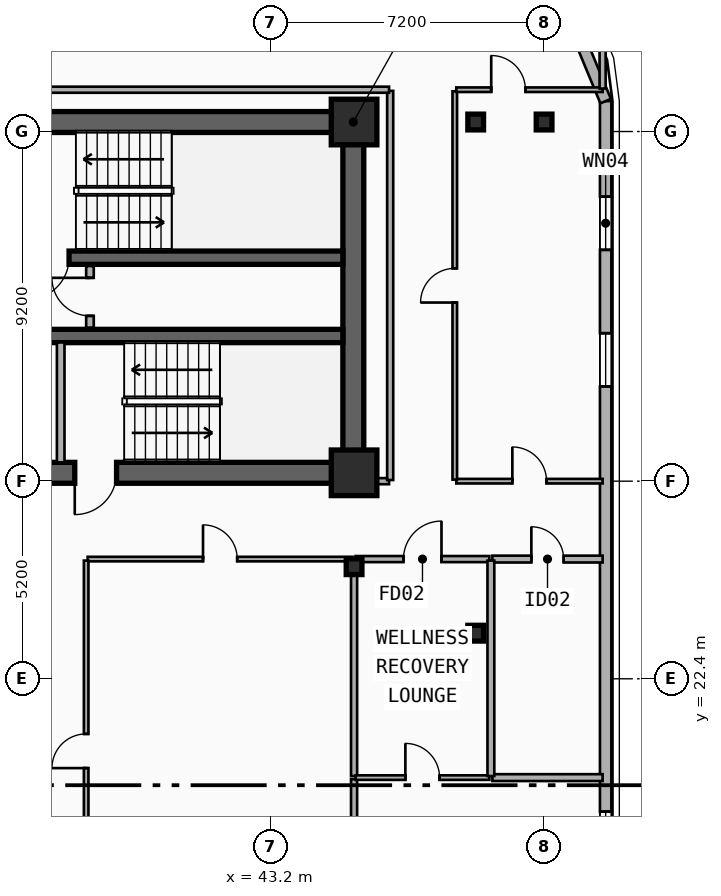
"""IFC4 building model, lengths in metres.
Left out: names, types, materials, properties, quantities, classifications, styles, units other than length and angle.
Written with IfcOpenShell. Run it as: python <this file> out.ifc"""

import sys

from ifc_helpers import new_model, si_unit, direction, frame, frame_2d, origin, origin_2d, place, context, subcontext, project, spatial, rectangle, i_section, extrude, element, fill, save


model = new_model("IFC4")
c1 = context("Model", 3, precision=1e-05, world=origin(), true_north=direction((0.0, 1.0)))
c2 = subcontext(c1, "Body", "Model", "MODEL_VIEW")
j1 = project(units=[si_unit("LENGTHUNIT", "METRE"), si_unit("PLANEANGLEUNIT", "RADIAN")], contexts=[c1])
p1 = place(None, origin())
s1 = spatial("IfcSite", under=j1, at=p1, CompositionType="ELEMENT")
p2 = place(p1, origin())
s2 = spatial("IfcBuilding", under=s1, at=p2, CompositionType="ELEMENT")
p3 = place(p2, frame((0.0, 0.0, 155.45)))
s3 = spatial("IfcBuildingStorey", under=s2, at=p3, CompositionType="ELEMENT", Elevation=155.45)
p4 = place(p3, frame((12.15, 37.05, 0.0), z_axis=(0.0, 0.0, 1.0), x_axis=(1.0, 0.0, 0.0)))
e1 = element("IfcWall", 1, at=p4, inside=s3, PredefinedType="SHEAR", context=c2, shape_type="SweptSolid", body=[
    extrude(rectangle(XDim=33.23, YDim=0.55, at=frame_2d((16.615, 0.0))), origin(), (0.0, 0.0, 1.0), 3.55),
])
p5 = place(p3, frame((45.38, 27.82, 0.0), z_axis=(0.0, 0.0, 1.0), x_axis=(-1.0, 0.0, 0.0)))
e2 = element("IfcWall", 2, at=p5, inside=s3, PredefinedType="SHEAR", context=c2, shape_type="SweptSolid", body=[
    extrude(rectangle(XDim=12.23, YDim=0.55, at=frame_2d((6.115, 0.0))), origin(), (0.0, 0.0, 1.0), 3.55),
])
p6 = place(p5, frame((9.93, 0.0, 0.0)))
e3 = element("IfcOpeningElement", 3, at=p6, cuts=e2, PredefinedType="OPENING", context=c2, shape_type="SweptSolid", body=[
    extrude(rectangle(XDim=1.1, YDim=2.15, at=frame_2d((0.55, 1.075))), frame((0.0, 0.285, 0.0), z_axis=(0.0, -1.0, 0.0), x_axis=(1.0, 0.0, 0.0)), (0.0, 0.0, 1.0), 0.57),
])
p7 = place(p5, frame((6.23, 0.0, 0.0)))
e4 = element("IfcOpeningElement", 4, at=p7, cuts=e2, PredefinedType="OPENING", context=c2, shape_type="SweptSolid", body=[
    extrude(rectangle(XDim=1.1, YDim=2.15, at=frame_2d((0.55, 1.075))), frame((0.0, 0.285, 0.0), z_axis=(0.0, -1.0, 0.0), x_axis=(1.0, 0.0, 0.0)), (0.0, 0.0, 1.0), 0.57),
])
p8 = place(p3, frame((45.38, 28.095, 0.0), z_axis=(0.0, 0.0, 1.0), x_axis=(0.0, 1.0, 0.0)))
e5 = element("IfcWall", 5, at=p8, inside=s3, PredefinedType="SHEAR", context=c2, shape_type="SweptSolid", body=[
    extrude(rectangle(XDim=8.68, YDim=0.55, at=frame_2d((4.34, 0.0))), origin(), (0.0, 0.0, 1.0), 3.55),
])
p9 = place(p3, frame((45.105, 33.48, 0.0), z_axis=(0.0, 0.0, 1.0), x_axis=(-1.0, 0.0, 0.0)))
e6 = element("IfcWall", 6, at=p9, inside=s3, PredefinedType="SHEAR", context=c2, shape_type="SweptSolid", body=[
    extrude(rectangle(XDim=8.55, YDim=0.35, at=frame_2d((4.275, 0.0))), origin(), (0.0, 0.0, 1.0), 3.55),
])
p10 = place(p9, frame((7.205, 0.0, 0.0)))
e7 = element("IfcOpeningElement", 7, at=p10, cuts=e6, PredefinedType="OPENING", context=c2, shape_type="SweptSolid", body=[
    extrude(rectangle(XDim=1.1, YDim=2.15, at=frame_2d((0.55, 1.075))), frame((0.0, 0.185, 0.0), z_axis=(0.0, -1.0, 0.0), x_axis=(1.0, 0.0, 0.0)), (0.0, 0.0, 1.0), 0.37),
])
p11 = place(p3, frame((36.555, 31.42, 0.0), z_axis=(0.0, 0.0, 1.0), x_axis=(1.0, 0.0, 0.0)))
e8 = element("IfcWall", 8, at=p11, inside=s3, PredefinedType="SHEAR", context=c2, shape_type="SweptSolid", body=[
    extrude(rectangle(XDim=8.55, YDim=0.35, at=frame_2d((4.275, 0.0))), origin(), (0.0, 0.0, 1.0), 3.55),
])
for number, where, z_axis, x_axis in (
    (9, (45.4, 27.82, 0.0), (0.0, 0.0, 1.0), (1.0, 0.0, 0.0)),
    (10, (45.4, 37.05, 0.0), (0.0, 0.0, 1.0), (1.0, 0.0, 0.0)),
):
    element("IfcColumn", number, at=place(p3, frame(where, z_axis=z_axis, x_axis=x_axis)), inside=s3, PredefinedType="COLUMN", context=c2, shape_type="SweptSolid", body=[
        extrude(rectangle(XDim=1.2, YDim=1.2, at=origin_2d()), origin(), (0.0, 0.0, 1.0), 3.55),
    ])
for number, where, z_axis, x_axis in (
    (11, (45.4, 25.35, 0.0), (0.0, 0.0, 1.0), (1.0, 0.0, 0.0)),
    (12, (48.6, 23.6, 0.0), (0.0, 0.0, 1.0), (1.0, 0.0, 0.0)),
    (13, (48.6, 37.05, 0.0), (0.0, 0.0, 1.0), (1.0, 0.0, 0.0)),
    (14, (50.4, 37.05, 0.0), (0.0, 0.0, 1.0), (1.0, 0.0, 0.0)),
):
    element("IfcColumn", number, at=place(p3, frame(where, z_axis=z_axis, x_axis=x_axis)), inside=s3, PredefinedType="COLUMN", context=c2, shape_type="SweptSolid", body=[
        extrude(i_section(OverallWidth=0.413, OverallDepth=0.415, WebThickness=0.03, FlangeThickness=0.047, FilletRadius=0.015, at=origin_2d()), origin(), (0.0, 0.0, 1.0), 3.55),
    ])
p12 = place(p3, frame((52.02, 37.6, 0.0), z_axis=(0.0, 0.0, 1.0), x_axis=(0.0, -1.0, 0.0)))
e15 = element("IfcWall", 15, at=p12, inside=s3, PredefinedType="SOLIDWALL", context=c2, shape_type="SweptSolid", body=[
    extrude(rectangle(XDim=23.0, YDim=0.3, at=frame_2d((11.5, 0.0))), origin(), (0.0, 0.0, 1.0), 3.29),
])
p13 = place(p12, frame((2.513, 0.0, 0.34)))
e16 = element("IfcOpeningElement", 16, at=p13, cuts=e15, PredefinedType="OPENING", context=c2, shape_type="SweptSolid", body=[
    extrude(rectangle(XDim=1.4, YDim=2.1, at=frame_2d((0.7, 1.05))), frame((0.0, 0.16, 0.0), z_axis=(0.0, -1.0, 0.0), x_axis=(1.0, 0.0, 0.0)), (0.0, 0.0, 1.0), 0.32),
])
p14 = place(p12, frame((6.107, 0.0, 0.34)))
e17 = element("IfcOpeningElement", 17, at=p14, cuts=e15, PredefinedType="OPENING", context=c2, shape_type="SweptSolid", body=[
    extrude(rectangle(XDim=1.4, YDim=2.1, at=frame_2d((0.7, 1.05))), frame((0.0, 0.16, 0.0), z_axis=(0.0, -1.0, 0.0), x_axis=(1.0, 0.0, 0.0)), (0.0, 0.0, 1.0), 0.32),
])
p15 = place(p12, frame((18.693, 0.0, 0.34)))
e18 = element("IfcOpeningElement", 18, at=p15, cuts=e15, PredefinedType="OPENING", context=c2, shape_type="SweptSolid", body=[
    extrude(rectangle(XDim=1.4, YDim=2.1, at=frame_2d((0.7, 1.05))), frame((0.0, 0.16, 0.0), z_axis=(0.0, -1.0, 0.0), x_axis=(1.0, 0.0, 0.0)), (0.0, 0.0, 1.0), 0.32),
])
p16 = place(p12, frame((20.687, 0.0, 0.34)))
e19 = element("IfcOpeningElement", 19, at=p16, cuts=e15, PredefinedType="OPENING", context=c2, shape_type="SweptSolid", body=[
    extrude(rectangle(XDim=1.4, YDim=2.1, at=frame_2d((0.7, 1.05))), frame((0.0, 0.16, 0.0), z_axis=(0.0, -1.0, 0.0), x_axis=(1.0, 0.0, 0.0)), (0.0, 0.0, 1.0), 0.32),
])
p17 = place(p3, frame((50.843, 40.443, 0.0), z_axis=(0.0, 0.0, 1.0), x_axis=(0.382704529509, -0.923870793506, 0.0)))
e20 = element("IfcWall", 20, at=p17, inside=s3, PredefinedType="SOLIDWALL", context=c2, shape_type="SweptSolid", body=[
    extrude(rectangle(XDim=3.077, YDim=0.3, at=frame_2d((1.538, 0.0))), origin(), (0.0, 0.0, 1.0), 3.29),
])
p18 = place(p3, frame((37.68, 28.095, 0.0), z_axis=(0.0, 0.0, 1.0), x_axis=(0.0, 1.0, 0.0)))
e21 = element("IfcWall", 21, at=p18, inside=s3, PredefinedType="PARTITIONING", context=c2, shape_type="SweptSolid", body=[
    extrude(rectangle(XDim=3.155, YDim=0.2, at=frame_2d((1.578, 0.0))), origin(), (0.0, 0.0, 1.0), 2.67),
])
p19 = place(p3, frame((38.45, 31.64, 0.0), z_axis=(0.0, 0.0, 1.0), x_axis=(0.0, 1.0, 0.0)))
e22 = element("IfcWall", 22, at=p19, inside=s3, PredefinedType="PARTITIONING", context=c2, shape_type="SweptSolid", body=[
    extrude(rectangle(XDim=1.62, YDim=0.2, at=frame_2d((0.81, 0.0))), origin(), (0.0, 0.0, 1.0), 3.29),
])
p20 = place(p19, frame((0.31, 0.0, 0.0)))
e23 = element("IfcOpeningElement", 23, at=p20, cuts=e22, PredefinedType="OPENING", context=c2, shape_type="SweptSolid", body=[
    extrude(rectangle(XDim=1.0, YDim=2.15, at=frame_2d((0.5, 1.075))), frame((0.0, 0.11, 0.0), z_axis=(0.0, -1.0, 0.0), x_axis=(1.0, 0.0, 0.0)), (0.0, 0.0, 1.0), 0.22),
])
p21 = place(p3, frame((48.09, 27.6, 0.0), z_axis=(0.0, 0.0, 1.0), x_axis=(1.0, 0.0, 0.0)))
e24 = element("IfcWall", 24, at=p21, inside=s3, PredefinedType="PARTITIONING", context=c2, shape_type="SweptSolid", body=[
    extrude(rectangle(XDim=3.85, YDim=0.12, at=frame_2d((1.925, 0.0))), origin(), (0.0, 0.0, 1.0), 2.62),
])
p22 = place(p21, frame((1.475, 0.0, 0.0)))
e25 = element("IfcOpeningElement", 25, at=p22, cuts=e24, PredefinedType="OPENING", context=c2, shape_type="SweptSolid", body=[
    extrude(rectangle(XDim=0.9, YDim=2.1, at=frame_2d((0.45, 1.05))), frame((0.0, 0.07, 0.0), z_axis=(0.0, -1.0, 0.0), x_axis=(1.0, 0.0, 0.0)), (0.0, 0.0, 1.0), 0.14),
])
p23 = place(p3, frame((38.39, 25.55, 0.0), z_axis=(0.0, 0.0, 1.0), x_axis=(1.0, 0.0, 0.0)))
e26 = element("IfcWall", 26, at=p23, inside=s3, PredefinedType="PARTITIONING", context=c2, shape_type="SweptSolid", body=[
    extrude(rectangle(XDim=6.97, YDim=0.12, at=frame_2d((3.485, 0.0))), origin(), (0.0, 0.0, 1.0), 2.36),
])
p24 = place(p23, frame((3.035, 0.0, 0.0)))
e27 = element("IfcOpeningElement", 27, at=p24, cuts=e26, PredefinedType="OPENING", context=c2, shape_type="SweptSolid", body=[
    extrude(rectangle(XDim=0.9, YDim=2.1, at=frame_2d((0.45, 1.05))), frame((0.0, 0.07, 0.0), z_axis=(0.0, -1.0, 0.0), x_axis=(1.0, 0.0, 0.0)), (0.0, 0.0, 1.0), 0.14),
])
p25 = place(p3, frame((45.44, 25.55, 0.0), z_axis=(0.0, 0.0, 1.0), x_axis=(1.0, 0.0, 0.0)))
e28 = element("IfcWall", 28, at=p25, inside=s3, PredefinedType="PARTITIONING", context=c2, shape_type="SweptSolid", body=[
    extrude(rectangle(XDim=3.52, YDim=0.16, at=frame_2d((1.76, 0.0))), origin(), (0.0, 0.0, 1.0), 2.36),
])
p26 = place(p25, frame((1.26, 0.0, 0.0)))
e29 = element("IfcOpeningElement", 29, at=p26, cuts=e28, PredefinedType="OPENING", context=c2, shape_type="SweptSolid", body=[
    extrude(rectangle(XDim=1.0, YDim=2.15, at=frame_2d((0.5, 1.075))), frame((0.0, 0.09, 0.0), z_axis=(0.0, -1.0, 0.0), x_axis=(1.0, 0.0, 0.0)), (0.0, 0.0, 1.0), 0.18),
])
p27 = place(p3, frame((49.04, 25.55, 0.0), z_axis=(0.0, 0.0, 1.0), x_axis=(1.0, 0.0, 0.0)))
e30 = element("IfcWall", 30, at=p27, inside=s3, PredefinedType="PLUMBINGWALL", context=c2, shape_type="SweptSolid", body=[
    extrude(rectangle(XDim=2.9, YDim=0.18, at=frame_2d((1.45, 0.0))), origin(), (0.0, 0.0, 1.0), 2.62),
])
p28 = place(p27, frame((1.025, 0.0, 0.0)))
e31 = element("IfcOpeningElement", 31, at=p28, cuts=e30, PredefinedType="OPENING", context=c2, shape_type="SweptSolid", body=[
    extrude(rectangle(XDim=0.85, YDim=2.1, at=frame_2d((0.425, 1.05))), frame((0.0, 0.1, 0.0), z_axis=(0.0, -1.0, 0.0), x_axis=(1.0, 0.0, 0.0)), (0.0, 0.0, 1.0), 0.2),
])
p29 = place(p3, frame((48.05, 27.64, 0.0), z_axis=(0.0, 0.0, 1.0), x_axis=(0.0, 1.0, 0.0)))
e32 = element("IfcWall", 32, at=p29, inside=s3, PredefinedType="PARTITIONING", context=c2, shape_type="SweptSolid", body=[
    extrude(rectangle(XDim=10.22, YDim=0.12, at=frame_2d((5.11, 0.0))), origin(), (0.0, 0.0, 1.0), 2.77),
])
p30 = place(p29, frame((4.66, 0.0, 0.0)))
e33 = element("IfcOpeningElement", 33, at=p30, cuts=e32, PredefinedType="OPENING", context=c2, shape_type="SweptSolid", body=[
    extrude(rectangle(XDim=0.9, YDim=2.1, at=frame_2d((0.45, 1.05))), frame((0.0, 0.07, 0.0), z_axis=(0.0, -1.0, 0.0), x_axis=(1.0, 0.0, 0.0)), (0.0, 0.0, 1.0), 0.14),
])
p31 = place(p3, frame((48.09, 37.9, 0.0), z_axis=(0.0, 0.0, 1.0), x_axis=(1.0, 0.0, 0.0)))
e34 = element("IfcWall", 34, at=p31, inside=s3, PredefinedType="PARTITIONING", context=c2, shape_type="SweptSolid", body=[
    extrude(rectangle(XDim=3.85, YDim=0.12, at=frame_2d((1.925, 0.0))), origin(), (0.0, 0.0, 1.0), 3.29),
])
p32 = place(p31, frame((0.919, 0.0, 0.0)))
e35 = element("IfcOpeningElement", 35, at=p32, cuts=e34, PredefinedType="OPENING", context=c2, shape_type="SweptSolid", body=[
    extrude(rectangle(XDim=0.9, YDim=2.1, at=frame_2d((0.45, 1.05))), frame((0.0, 0.07, 0.0), z_axis=(0.0, -1.0, 0.0), x_axis=(1.0, 0.0, 0.0)), (0.0, 0.0, 1.0), 0.14),
])
p33 = place(p3, frame((38.35, 15.49, 0.0), z_axis=(0.0, 0.0, 1.0), x_axis=(0.0, 1.0, 0.0)))
e36 = element("IfcWall", 36, at=p33, inside=s3, PredefinedType="PARTITIONING", context=c2, shape_type="SweptSolid", body=[
    extrude(rectangle(XDim=10.02, YDim=0.12, at=frame_2d((5.01, 0.0))), origin(), (0.0, 0.0, 1.0), 2.77),
])
p34 = place(p33, frame((4.56, 0.0, 0.0)))
e37 = element("IfcOpeningElement", 37, at=p34, cuts=e36, PredefinedType="OPENING", context=c2, shape_type="SweptSolid", body=[
    extrude(rectangle(XDim=0.9, YDim=2.1, at=frame_2d((0.45, 1.05))), frame((0.0, 0.07, 0.0), z_axis=(0.0, -1.0, 0.0), x_axis=(1.0, 0.0, 0.0)), (0.0, 0.0, 1.0), 0.14),
])
p35 = place(p3, frame((45.4, 10.66, 0.0), z_axis=(0.0, 0.0, 1.0), x_axis=(0.0, 1.0, 0.0)))
e38 = element("IfcWall", 38, at=p35, inside=s3, PredefinedType="PARTITIONING", context=c2, shape_type="SweptSolid", body=[
    extrude(rectangle(XDim=9.1, YDim=0.16, at=frame_2d((4.55, 0.0))), origin(), (0.0, 0.0, 1.0), 2.36),
])
p36 = place(p3, frame((45.4, 19.84, 0.0), z_axis=(0.0, 0.0, 1.0), x_axis=(0.0, 1.0, 0.0)))
e39 = element("IfcWall", 39, at=p36, inside=s3, PredefinedType="PARTITIONING", context=c2, shape_type="SweptSolid", body=[
    extrude(rectangle(XDim=5.67, YDim=0.16, at=frame_2d((2.835, 0.0))), origin(), (0.0, 0.0, 1.0), 2.36),
])
p37 = place(p3, frame((45.44, 19.8, 0.0), z_axis=(0.0, 0.0, 1.0), x_axis=(1.0, 0.0, 0.0)))
e40 = element("IfcWall", 40, at=p37, inside=s3, PredefinedType="PARTITIONING", context=c2, shape_type="SweptSolid", body=[
    extrude(rectangle(XDim=3.52, YDim=0.12, at=frame_2d((1.76, 0.0))), origin(), (0.0, 0.0, 1.0), 2.36),
])
p38 = place(p37, frame((1.31, 0.0, 0.0)))
e41 = element("IfcOpeningElement", 41, at=p38, cuts=e40, PredefinedType="OPENING", context=c2, shape_type="SweptSolid", body=[
    extrude(rectangle(XDim=0.9, YDim=2.1, at=frame_2d((0.45, 1.05))), frame((0.0, 0.07, 0.0), z_axis=(0.0, -1.0, 0.0), x_axis=(1.0, 0.0, 0.0)), (0.0, 0.0, 1.0), 0.14),
])
p39 = place(p3, frame((49.04, 19.8, 0.0), z_axis=(0.0, 0.0, 1.0), x_axis=(1.0, 0.0, 0.0)))
e42 = element("IfcWall", 42, at=p39, inside=s3, PredefinedType="PLUMBINGWALL", context=c2, shape_type="SweptSolid", body=[
    extrude(rectangle(XDim=2.9, YDim=0.18, at=frame_2d((1.45, 0.0))), origin(), (0.0, 0.0, 1.0), 2.62),
])
p40 = place(p3, frame((49.0, 19.84, 0.0), z_axis=(0.0, 0.0, 1.0), x_axis=(0.0, 1.0, 0.0)))
e43 = element("IfcWall", 43, at=p40, inside=s3, PredefinedType="PLUMBINGWALL", context=c2, shape_type="SweptSolid", body=[
    extrude(rectangle(XDim=5.67, YDim=0.18, at=frame_2d((2.835, 0.0))), origin(), (0.0, 0.0, 1.0), 2.77),
])
p41 = place(p3, frame((45.41, 27.6, 0.0), z_axis=(0.0, 0.0, 1.0), x_axis=(1.0, 0.0, 0.0)))
e44 = element("IfcWall", 44, at=p41, inside=s3, PredefinedType="PARTITIONING", context=c2, shape_type="SweptSolid", body=[
    extrude(rectangle(XDim=0.91, YDim=0.16, at=frame_2d((0.455, 0.0))), origin(), (0.0, 0.0, 1.0), 2.36),
])
p42 = place(p3, frame((46.35, 27.63, 0.0), z_axis=(0.0, 0.0, 1.0), x_axis=(0.0, 1.0, 0.0)))
e45 = element("IfcWall", 45, at=p42, inside=s3, PredefinedType="PARTITIONING", context=c2, shape_type="SweptSolid", body=[
    extrude(rectangle(XDim=10.24, YDim=0.16, at=frame_2d((5.12, 0.0))), origin(), (0.0, 0.0, 1.0), 2.77),
])
p43 = place(p3, frame((11.28, 37.9, 0.0), z_axis=(0.0, 0.0, 1.0), x_axis=(1.0, 0.0, 0.0)))
e46 = element("IfcWall", 46, at=p43, inside=s3, PredefinedType="PARTITIONING", context=c2, shape_type="SweptSolid", body=[
    extrude(rectangle(XDim=35.04, YDim=0.16, at=frame_2d((17.52, 0.0))), origin(), (0.0, 0.0, 1.0), 3.29),
])
p44 = place(p3, frame((51.94, 37.93, 0.0), z_axis=(0.0, 0.0, 1.0), x_axis=(0.0, 1.0, 0.0)))
e47 = element("IfcWall", 47, at=p44, inside=s3, PredefinedType="PARTITIONING", context=c2, shape_type="SweptSolid", body=[
    extrude(rectangle(XDim=1.44, YDim=0.16, at=frame_2d((0.72, 0.0))), origin(), (0.0, 0.0, 1.0), 3.29),
])
p45 = place(p13, origin())
e48 = element("IfcWindow", 48, at=p45, inside=s3, PartitioningType="SINGLE_PANEL", PredefinedType="WINDOW", context=c2, shape_type="SweptSolid", body=[
    extrude(rectangle(XDim=1.4, YDim=2.1, at=frame_2d((0.7, 1.05))), frame((0.0, 0.03, 0.0), z_axis=(0.0, -1.0, 0.0), x_axis=(1.0, 0.0, 0.0)), (0.0, 0.0, 1.0), 0.06),
])
fill(e16, e48)
p46 = place(p14, origin())
e49 = element("IfcWindow", 49, at=p46, inside=s3, PartitioningType="SINGLE_PANEL", PredefinedType="WINDOW", context=c2, shape_type="SweptSolid", body=[
    extrude(rectangle(XDim=1.4, YDim=2.1, at=frame_2d((0.7, 1.05))), frame((0.0, 0.03, 0.0), z_axis=(0.0, -1.0, 0.0), x_axis=(1.0, 0.0, 0.0)), (0.0, 0.0, 1.0), 0.06),
])
fill(e17, e49)
p47 = place(p15, origin())
e50 = element("IfcWindow", 50, at=p47, inside=s3, PartitioningType="SINGLE_PANEL", PredefinedType="WINDOW", context=c2, shape_type="SweptSolid", body=[
    extrude(rectangle(XDim=1.4, YDim=2.1, at=frame_2d((0.7, 1.05))), frame((0.0, 0.03, 0.0), z_axis=(0.0, -1.0, 0.0), x_axis=(1.0, 0.0, 0.0)), (0.0, 0.0, 1.0), 0.06),
])
fill(e18, e50)
p48 = place(p10, origin())
e51 = element("IfcDoor", 51, at=p48, inside=s3, OperationType="SINGLE_SWING_RIGHT", PredefinedType="DOOR", context=c2, shape_type="SweptSolid", body=[
    extrude(rectangle(XDim=1.1, YDim=2.15, at=frame_2d((0.55, 1.075))), frame((0.0, 0.025, 0.0), z_axis=(0.0, -1.0, 0.0), x_axis=(1.0, 0.0, 0.0)), (0.0, 0.0, 1.0), 0.05),
])
fill(e7, e51)
p49 = place(p7, origin())
e52 = element("IfcDoor", 52, at=p49, inside=s3, OperationType="SINGLE_SWING_RIGHT", PredefinedType="DOOR", context=c2, shape_type="SweptSolid", body=[
    extrude(rectangle(XDim=1.1, YDim=2.15, at=frame_2d((0.55, 1.075))), frame((0.0, 0.025, 0.0), z_axis=(0.0, -1.0, 0.0), x_axis=(1.0, 0.0, 0.0)), (0.0, 0.0, 1.0), 0.05),
])
fill(e4, e52)
p50 = place(p20, origin())
e53 = element("IfcDoor", 53, at=p50, inside=s3, OperationType="SINGLE_SWING_RIGHT", PredefinedType="DOOR", context=c2, shape_type="SweptSolid", body=[
    extrude(rectangle(XDim=1.0, YDim=2.15, at=frame_2d((0.5, 1.075))), frame((0.0, 0.025, 0.0), z_axis=(0.0, -1.0, 0.0), x_axis=(1.0, 0.0, 0.0)), (0.0, 0.0, 1.0), 0.05),
])
fill(e23, e53)
p51 = place(p22, origin())
e54 = element("IfcDoor", 54, at=p51, inside=s3, OperationType="SINGLE_SWING_LEFT", PredefinedType="DOOR", context=c2, shape_type="SweptSolid", body=[
    extrude(rectangle(XDim=0.9, YDim=2.1, at=frame_2d((0.45, 1.05))), frame((0.0, 0.025, 0.0), z_axis=(0.0, -1.0, 0.0), x_axis=(1.0, 0.0, 0.0)), (0.0, 0.0, 1.0), 0.05),
])
fill(e25, e54)
p52 = place(p24, origin())
e55 = element("IfcDoor", 55, at=p52, inside=s3, OperationType="SINGLE_SWING_LEFT", PredefinedType="DOOR", context=c2, shape_type="SweptSolid", body=[
    extrude(rectangle(XDim=0.9, YDim=2.1, at=frame_2d((0.45, 1.05))), frame((0.0, 0.025, 0.0), z_axis=(0.0, -1.0, 0.0), x_axis=(1.0, 0.0, 0.0)), (0.0, 0.0, 1.0), 0.05),
])
fill(e27, e55)
p53 = place(p26, origin())
e56 = element("IfcDoor", 56, at=p53, inside=s3, OperationType="SINGLE_SWING_RIGHT", PredefinedType="DOOR", context=c2, shape_type="SweptSolid", body=[
    extrude(rectangle(XDim=1.0, YDim=2.15, at=frame_2d((0.5, 1.075))), frame((0.0, 0.025, 0.0), z_axis=(0.0, -1.0, 0.0), x_axis=(1.0, 0.0, 0.0)), (0.0, 0.0, 1.0), 0.05),
])
fill(e29, e56)
p54 = place(p28, origin())
e57 = element("IfcDoor", 57, at=p54, inside=s3, OperationType="SINGLE_SWING_LEFT", PredefinedType="DOOR", context=c2, shape_type="SweptSolid", body=[
    extrude(rectangle(XDim=0.85, YDim=2.1, at=frame_2d((0.425, 1.05))), frame((0.0, 0.025, 0.0), z_axis=(0.0, -1.0, 0.0), x_axis=(1.0, 0.0, 0.0)), (0.0, 0.0, 1.0), 0.05),
])
fill(e31, e57)
p55 = place(p30, origin())
e58 = element("IfcDoor", 58, at=p55, inside=s3, OperationType="SINGLE_SWING_LEFT", PredefinedType="DOOR", context=c2, shape_type="SweptSolid", body=[
    extrude(rectangle(XDim=0.9, YDim=2.1, at=frame_2d((0.45, 1.05))), frame((0.0, 0.025, 0.0), z_axis=(0.0, -1.0, 0.0), x_axis=(1.0, 0.0, 0.0)), (0.0, 0.0, 1.0), 0.05),
])
fill(e33, e58)
p56 = place(p32, origin())
e59 = element("IfcDoor", 59, at=p56, inside=s3, OperationType="SINGLE_SWING_LEFT", PredefinedType="DOOR", context=c2, shape_type="SweptSolid", body=[
    extrude(rectangle(XDim=0.9, YDim=2.1, at=frame_2d((0.45, 1.05))), frame((0.0, 0.025, 0.0), z_axis=(0.0, -1.0, 0.0), x_axis=(1.0, 0.0, 0.0)), (0.0, 0.0, 1.0), 0.05),
])
fill(e35, e59)
p57 = place(p34, origin())
e60 = element("IfcDoor", 60, at=p57, inside=s3, OperationType="SINGLE_SWING_LEFT", PredefinedType="DOOR", context=c2, shape_type="SweptSolid", body=[
    extrude(rectangle(XDim=0.9, YDim=2.1, at=frame_2d((0.45, 1.05))), frame((0.0, 0.025, 0.0), z_axis=(0.0, -1.0, 0.0), x_axis=(1.0, 0.0, 0.0)), (0.0, 0.0, 1.0), 0.05),
])
fill(e37, e60)
p58 = place(p38, origin())
e61 = element("IfcDoor", 61, at=p58, inside=s3, OperationType="SINGLE_SWING_LEFT", PredefinedType="DOOR", context=c2, shape_type="SweptSolid", body=[
    extrude(rectangle(XDim=0.9, YDim=2.1, at=frame_2d((0.45, 1.05))), frame((0.0, 0.025, 0.0), z_axis=(0.0, -1.0, 0.0), x_axis=(1.0, 0.0, 0.0)), (0.0, 0.0, 1.0), 0.05),
])
fill(e41, e61)
save(model, sys.argv[1])
